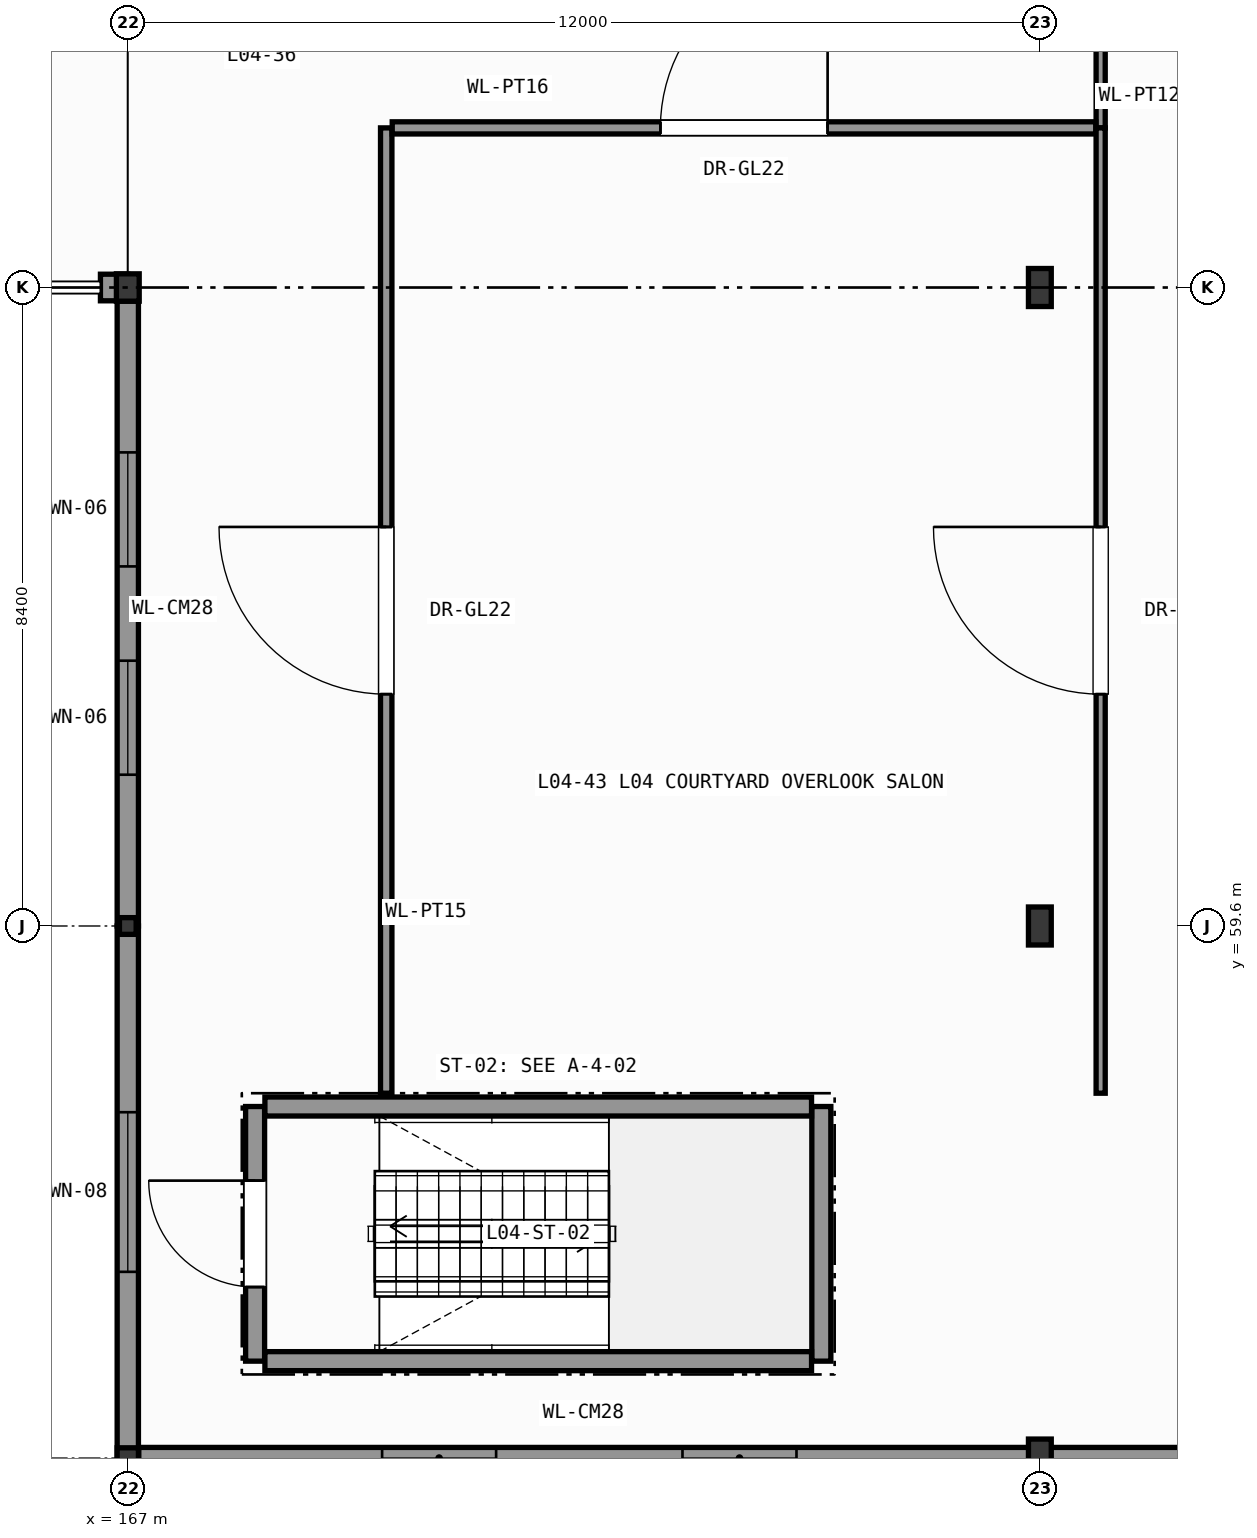
"""IFC4 building model, lengths in metres.
Left out: names, types, materials, properties, quantities, classifications, styles, units other than length and angle.
Written with IfcOpenShell. Run it as: python <this file> out.ifc"""

import sys

from ifc_helpers import new_model, si_unit, direction, frame, frame_2d, origin, origin_2d, place, context, subcontext, project, spatial, rectangle, hollow_rectangle, i_section, extrude, element, fill, save


model = new_model("IFC4")
c1 = context("Model", 3, precision=1e-05, world=origin(), true_north=direction((0.0, 1.0)))
c2 = subcontext(c1, "Body", "Model", "MODEL_VIEW")
j1 = project(units=[si_unit("LENGTHUNIT", "METRE"), si_unit("PLANEANGLEUNIT", "RADIAN")], contexts=[c1])
p1 = place(None, origin())
s1 = spatial("IfcSite", under=j1, at=p1, CompositionType="ELEMENT")
p2 = place(p1, origin())
s2 = spatial("IfcBuilding", under=s1, at=p2, CompositionType="ELEMENT")
p3 = place(p2, frame((0.0, 0.0, 18.0)))
s3 = spatial("IfcBuildingStorey", under=s2, at=p3, CompositionType="ELEMENT", Elevation=18.0)
p4 = place(p3, frame((167.0, 52.6, 0.0), z_axis=(0.0, 0.0, 1.0), x_axis=(1.0, 0.0, 0.0)))
e1 = element("IfcColumn", 1, at=p4, inside=s3, PredefinedType="COLUMN", context=c2, shape_type="SweptSolid", body=[
    extrude(i_section(OverallWidth=0.28, OverallDepth=0.27, WebThickness=0.008, FlangeThickness=0.013, FilletRadius=0.024, at=origin_2d()), origin(), (0.0, 0.0, 1.0), 4.2),
])
p5 = place(p3, frame((167.0, 59.6, 0.0), z_axis=(0.0, 0.0, 1.0), x_axis=(1.0, 0.0, 0.0)))
e2 = element("IfcColumn", 2, at=p5, inside=s3, PredefinedType="COLUMN", context=c2, shape_type="SweptSolid", body=[
    extrude(hollow_rectangle(XDim=0.22, YDim=0.22, WallThickness=0.012, InnerFilletRadius=0.012, OuterFilletRadius=0.024, at=origin_2d()), origin(), (0.0, 0.0, 1.0), 4.2),
])
p6 = place(p3, frame((167.0, 68.0, 0.0), z_axis=(0.0, 0.0, 1.0), x_axis=(1.0, 0.0, 0.0)))
e3 = element("IfcColumn", 3, at=p6, inside=s3, PredefinedType="COLUMN", context=c2, shape_type="SweptSolid", body=[
    extrude(i_section(OverallWidth=0.3, OverallDepth=0.36, WebThickness=0.012, FlangeThickness=0.022, FilletRadius=0.027, at=origin_2d()), origin(), (0.0, 0.0, 1.0), 4.2),
])
for number, where, z_axis, x_axis in (
    (4, (179.0, 52.6, 0.0), (0.0, 0.0, 1.0), (1.0, 0.0, 0.0)),
    (5, (179.0, 59.6, 0.0), (0.0, 0.0, 1.0), (1.0, 0.0, 0.0)),
    (6, (179.0, 68.0, 0.0), (0.0, 0.0, 1.0), (1.0, 0.0, 0.0)),
):
    element("IfcColumn", number, at=place(p3, frame(where, z_axis=z_axis, x_axis=x_axis)), inside=s3, PredefinedType="COLUMN", context=c2, shape_type="SweptSolid", body=[
        extrude(i_section(OverallWidth=0.3, OverallDepth=0.5, WebThickness=0.014, FlangeThickness=0.028, FilletRadius=0.027, at=origin_2d()), origin(), (0.0, 0.0, 1.0), 4.2),
    ])
p7 = place(p3, frame((166.64, 68.0, 0.0), z_axis=(0.0, 0.0, 1.0), x_axis=(1.0, 0.0, 0.0)))
e7 = element("IfcWall", 7, at=p7, inside=s3, PredefinedType="SOLIDWALL", context=c2, shape_type="SweptSolid", body=[
    extrude(rectangle(XDim=0.36, YDim=0.35, at=frame_2d((0.18, 0.0))), origin(), (0.0, 0.0, 1.0), 3.385),
])
p8 = place(p3, frame((167.0, 59.6, 0.0), z_axis=(0.0, 0.0, 1.0), x_axis=(0.0, 1.0, 0.0)))
e8 = element("IfcWall", 8, at=p8, inside=s3, PredefinedType="SOLIDWALL", context=c2, shape_type="SweptSolid", body=[
    extrude(rectangle(XDim=8.221, YDim=0.28, at=frame_2d((4.11, 0.0))), origin(), (0.0, 0.0, 1.0), 3.495),
])
p9 = place(p8, frame((1.99, 0.0, 0.95)))
e9 = element("IfcOpeningElement", 9, at=p9, cuts=e8, PredefinedType="OPENING", context=c2, shape_type="SweptSolid", body=[
    extrude(rectangle(XDim=1.5, YDim=2.15, at=frame_2d((0.75, 1.075))), frame((0.0, 0.15, 0.0), z_axis=(0.0, -1.0, 0.0), x_axis=(1.0, 0.0, 0.0)), (0.0, 0.0, 1.0), 0.3),
])
p10 = place(p8, frame((4.731, 0.0, 0.95)))
e10 = element("IfcOpeningElement", 10, at=p10, cuts=e8, PredefinedType="OPENING", context=c2, shape_type="SweptSolid", body=[
    extrude(rectangle(XDim=1.5, YDim=2.15, at=frame_2d((0.75, 1.075))), frame((0.0, 0.15, 0.0), z_axis=(0.0, -1.0, 0.0), x_axis=(1.0, 0.0, 0.0)), (0.0, 0.0, 1.0), 0.3),
])
p11 = place(p3, frame((167.0, 52.6, 0.0), z_axis=(0.0, 0.0, 1.0), x_axis=(0.0, 1.0, 0.0)))
e11 = element("IfcWall", 11, at=p11, inside=s3, PredefinedType="SOLIDWALL", context=c2, shape_type="SweptSolid", body=[
    extrude(rectangle(XDim=7.0, YDim=0.28, at=frame_2d((3.5, 0.0))), origin(), (0.0, 0.0, 1.0), 3.645),
])
p12 = place(p11, frame((2.45, 0.0, 0.95)))
e12 = element("IfcOpeningElement", 12, at=p12, cuts=e11, PredefinedType="OPENING", context=c2, shape_type="SweptSolid", body=[
    extrude(rectangle(XDim=2.1, YDim=2.29, at=frame_2d((1.05, 1.145))), frame((0.0, 0.15, 0.0), z_axis=(0.0, -1.0, 0.0), x_axis=(1.0, 0.0, 0.0)), (0.0, 0.0, 1.0), 0.3),
])
p13 = place(p3, frame((179.0, 52.6, 0.0), z_axis=(0.0, 0.0, 1.0), x_axis=(-1.0, 0.0, 0.0)))
e13 = element("IfcWall", 13, at=p13, inside=s3, PredefinedType="SOLIDWALL", context=c2, shape_type="SweptSolid", body=[
    extrude(rectangle(XDim=11.856, YDim=0.28, at=frame_2d((5.928, 0.0))), origin(), (0.0, 0.0, 1.0), 3.385),
])
p14 = place(p13, frame((3.202, 0.0, 0.95)))
e14 = element("IfcOpeningElement", 14, at=p14, cuts=e13, PredefinedType="OPENING", context=c2, shape_type="SweptSolid", body=[
    extrude(rectangle(XDim=1.5, YDim=2.04, at=frame_2d((0.75, 1.02))), frame((0.0, 0.15, 0.0), z_axis=(0.0, -1.0, 0.0), x_axis=(1.0, 0.0, 0.0)), (0.0, 0.0, 1.0), 0.3),
])
p15 = place(p13, frame((7.154, 0.0, 0.95)))
e15 = element("IfcOpeningElement", 15, at=p15, cuts=e13, PredefinedType="OPENING", context=c2, shape_type="SweptSolid", body=[
    extrude(rectangle(XDim=1.5, YDim=2.04, at=frame_2d((0.75, 1.02))), frame((0.0, 0.15, 0.0), z_axis=(0.0, -1.0, 0.0), x_axis=(1.0, 0.0, 0.0)), (0.0, 0.0, 1.0), 0.3),
])
p16 = place(p3, frame((192.11, 52.6, 0.0), z_axis=(0.0, 0.0, 1.0), x_axis=(-1.0, 0.0, 0.0)))
e16 = element("IfcWall", 16, at=p16, inside=s3, PredefinedType="SOLIDWALL", context=c2, shape_type="SweptSolid", body=[
    extrude(rectangle(XDim=13.11, YDim=0.28, at=frame_2d((6.555, 0.0))), origin(), (0.0, 0.0, 1.0), 3.385),
])
p17 = place(p16, frame((3.32, 0.0, 0.95)))
e17 = element("IfcOpeningElement", 17, at=p17, cuts=e16, PredefinedType="OPENING", context=c2, shape_type="SweptSolid", body=[
    extrude(rectangle(XDim=2.1, YDim=2.04, at=frame_2d((1.05, 1.02))), frame((0.0, 0.15, 0.0), z_axis=(0.0, -1.0, 0.0), x_axis=(1.0, 0.0, 0.0)), (0.0, 0.0, 1.0), 0.3),
])
p18 = place(p16, frame((7.69, 0.0, 0.95)))
e18 = element("IfcOpeningElement", 18, at=p18, cuts=e16, PredefinedType="OPENING", context=c2, shape_type="SweptSolid", body=[
    extrude(rectangle(XDim=2.1, YDim=2.04, at=frame_2d((1.05, 1.02))), frame((0.0, 0.15, 0.0), z_axis=(0.0, -1.0, 0.0), x_axis=(1.0, 0.0, 0.0)), (0.0, 0.0, 1.0), 0.3),
])
p19 = place(p3, frame((168.675, 53.875, 0.0), z_axis=(0.0, 0.0, 1.0), x_axis=(0.0, 1.0, 0.0)))
e19 = element("IfcWall", 19, at=p19, inside=s3, PredefinedType="SHEAR", context=c2, shape_type="SweptSolid", body=[
    extrude(rectangle(XDim=3.35, YDim=0.25, at=frame_2d((1.675, 0.0))), origin(), (0.0, 0.0, 1.0), 3.98),
])
p20 = place(p19, frame((0.975, 0.0, 0.0)))
e20 = element("IfcOpeningElement", 20, at=p20, cuts=e19, PredefinedType="OPENING", context=c2, shape_type="SweptSolid", body=[
    extrude(rectangle(XDim=1.4, YDim=2.2, at=frame_2d((0.7, 1.1))), frame((0.0, 0.135, 0.0), z_axis=(0.0, -1.0, 0.0), x_axis=(1.0, 0.0, 0.0)), (0.0, 0.0, 1.0), 0.27),
])
p21 = place(p3, frame((176.125, 53.875, 0.0), z_axis=(0.0, 0.0, 1.0), x_axis=(0.0, 1.0, 0.0)))
e21 = element("IfcWall", 21, at=p21, inside=s3, PredefinedType="SHEAR", context=c2, shape_type="SweptSolid", body=[
    extrude(rectangle(XDim=3.35, YDim=0.25, at=frame_2d((1.675, 0.0))), origin(), (0.0, 0.0, 1.0), 3.98),
])
for number, where, z_axis, x_axis in (
    (22, (168.804, 53.875, 0.0), (0.0, 0.0, 1.0), (1.0, 0.0, 0.0)),
    (23, (168.804, 57.225, 0.0), (0.0, 0.0, 1.0), (1.0, 0.0, 0.0)),
):
    element("IfcWall", number, at=place(p3, frame(where, z_axis=z_axis, x_axis=x_axis)), inside=s3, PredefinedType="SHEAR", context=c2, shape_type="SweptSolid", body=[
        extrude(rectangle(XDim=7.192, YDim=0.25, at=frame_2d((3.596, 0.0))), origin(), (0.0, 0.0, 1.0), 3.98),
    ])
p22 = place(p3, frame((170.4, 57.4, 0.0), z_axis=(0.0, 0.0, 1.0), x_axis=(0.0, 1.0, 0.0)))
e24 = element("IfcWall", 24, at=p22, inside=s3, PredefinedType="PARTITIONING", context=c2, shape_type="SweptSolid", body=[
    extrude(rectangle(XDim=12.7, YDim=0.15, at=frame_2d((6.35, 0.0))), origin(), (0.0, 0.0, 1.0), 3.98),
])
p23 = place(p22, frame((5.25, 0.0, 0.0)))
e25 = element("IfcOpeningElement", 25, at=p23, cuts=e24, PredefinedType="OPENING", context=c2, shape_type="SweptSolid", body=[
    extrude(rectangle(XDim=2.2, YDim=2.6, at=frame_2d((1.1, 1.3))), frame((0.0, 0.085, 0.0), z_axis=(0.0, -1.0, 0.0), x_axis=(1.0, 0.0, 0.0)), (0.0, 0.0, 1.0), 0.17),
])
p24 = place(p3, frame((179.8, 70.1, 0.0), z_axis=(0.0, 0.0, 1.0), x_axis=(0.0, 1.0, 0.0)))
e26 = element("IfcWall", 26, at=p24, inside=s3, PredefinedType="PARTITIONING", context=c2, shape_type="SweptSolid", body=[
    extrude(rectangle(XDim=3.4, YDim=0.12, at=frame_2d((1.7, 0.0))), origin(), (0.0, 0.0, 1.0), 3.98),
])
p25 = place(p24, frame((1.2, 0.0, 0.0)))
e27 = element("IfcOpeningElement", 27, at=p25, cuts=e26, PredefinedType="OPENING", context=c2, shape_type="SweptSolid", body=[
    extrude(rectangle(XDim=1.0, YDim=2.15, at=frame_2d((0.5, 1.075))), frame((0.0, 0.07, 0.0), z_axis=(0.0, -1.0, 0.0), x_axis=(1.0, 0.0, 0.0)), (0.0, 0.0, 1.0), 0.14),
])
p26 = place(p3, frame((170.479, 70.1, 0.0), z_axis=(0.0, 0.0, 1.0), x_axis=(1.0, 0.0, 0.0)))
e28 = element("IfcWall", 28, at=p26, inside=s3, PredefinedType="PARTITIONING", context=c2, shape_type="SweptSolid", body=[
    extrude(rectangle(XDim=9.257, YDim=0.16, at=frame_2d((4.628, 0.0))), origin(), (0.0, 0.0, 1.0), 3.98),
])
p27 = place(p26, frame((3.529, 0.0, 0.0)))
e29 = element("IfcOpeningElement", 29, at=p27, cuts=e28, PredefinedType="OPENING", context=c2, shape_type="SweptSolid", body=[
    extrude(rectangle(XDim=2.2, YDim=2.6, at=frame_2d((1.1, 1.3))), frame((0.0, 0.09, 0.0), z_axis=(0.0, -1.0, 0.0), x_axis=(1.0, 0.0, 0.0)), (0.0, 0.0, 1.0), 0.18),
])
p28 = place(p3, frame((179.8, 57.4, 0.0), z_axis=(0.0, 0.0, 1.0), x_axis=(0.0, 1.0, 0.0)))
e30 = element("IfcWall", 30, at=p28, inside=s3, PredefinedType="PARTITIONING", context=c2, shape_type="SweptSolid", body=[
    extrude(rectangle(XDim=12.7, YDim=0.12, at=frame_2d((6.35, 0.0))), origin(), (0.0, 0.0, 1.0), 3.98),
])
p29 = place(p28, frame((5.25, 0.0, 0.0)))
e31 = element("IfcOpeningElement", 31, at=p29, cuts=e30, PredefinedType="OPENING", context=c2, shape_type="SweptSolid", body=[
    extrude(rectangle(XDim=2.2, YDim=2.6, at=frame_2d((1.1, 1.3))), frame((0.0, 0.07, 0.0), z_axis=(0.0, -1.0, 0.0), x_axis=(1.0, 0.0, 0.0)), (0.0, 0.0, 1.0), 0.14),
])
p30 = place(p9, origin())
e32 = element("IfcWindow", 32, at=p30, inside=s3, PartitioningType="SINGLE_PANEL", PredefinedType="WINDOW", context=c2, shape_type="SweptSolid", body=[
    extrude(rectangle(XDim=1.5, YDim=2.15, at=frame_2d((0.75, 1.075))), frame((0.0, 0.03, 0.0), z_axis=(0.0, -1.0, 0.0), x_axis=(1.0, 0.0, 0.0)), (0.0, 0.0, 1.0), 0.06),
])
fill(e9, e32)
p31 = place(p10, origin())
e33 = element("IfcWindow", 33, at=p31, inside=s3, PartitioningType="SINGLE_PANEL", PredefinedType="WINDOW", context=c2, shape_type="SweptSolid", body=[
    extrude(rectangle(XDim=1.5, YDim=2.15, at=frame_2d((0.75, 1.075))), frame((0.0, 0.03, 0.0), z_axis=(0.0, -1.0, 0.0), x_axis=(1.0, 0.0, 0.0)), (0.0, 0.0, 1.0), 0.06),
])
fill(e10, e33)
p32 = place(p12, origin())
e34 = element("IfcWindow", 34, at=p32, inside=s3, PartitioningType="SINGLE_PANEL", PredefinedType="WINDOW", context=c2, shape_type="SweptSolid", body=[
    extrude(rectangle(XDim=2.1, YDim=2.29, at=frame_2d((1.05, 1.145))), frame((0.0, 0.03, 0.0), z_axis=(0.0, -1.0, 0.0), x_axis=(1.0, 0.0, 0.0)), (0.0, 0.0, 1.0), 0.06),
])
fill(e12, e34)
p33 = place(p14, origin())
e35 = element("IfcWindow", 35, at=p33, inside=s3, PartitioningType="SINGLE_PANEL", PredefinedType="WINDOW", context=c2, shape_type="SweptSolid", body=[
    extrude(rectangle(XDim=1.5, YDim=2.04, at=frame_2d((0.75, 1.02))), frame((0.0, 0.03, 0.0), z_axis=(0.0, -1.0, 0.0), x_axis=(1.0, 0.0, 0.0)), (0.0, 0.0, 1.0), 0.06),
])
fill(e14, e35)
p34 = place(p15, origin())
e36 = element("IfcWindow", 36, at=p34, inside=s3, PartitioningType="SINGLE_PANEL", PredefinedType="WINDOW", context=c2, shape_type="SweptSolid", body=[
    extrude(rectangle(XDim=1.5, YDim=2.04, at=frame_2d((0.75, 1.02))), frame((0.0, 0.03, 0.0), z_axis=(0.0, -1.0, 0.0), x_axis=(1.0, 0.0, 0.0)), (0.0, 0.0, 1.0), 0.06),
])
fill(e15, e36)
p35 = place(p20, origin())
e37 = element("IfcDoor", 37, at=p35, inside=s3, OperationType="SINGLE_SWING_RIGHT", PredefinedType="DOOR", context=c2, shape_type="SweptSolid", body=[
    extrude(rectangle(XDim=1.4, YDim=2.2, at=frame_2d((0.7, 1.1))), frame((0.0, 0.025, 0.0), z_axis=(0.0, -1.0, 0.0), x_axis=(1.0, 0.0, 0.0)), (0.0, 0.0, 1.0), 0.05),
])
fill(e20, e37)
p36 = place(p23, origin())
e38 = element("IfcDoor", 38, at=p36, inside=s3, OperationType="SINGLE_SWING_RIGHT", PredefinedType="DOOR", context=c2, shape_type="SweptSolid", body=[
    extrude(rectangle(XDim=2.2, YDim=2.6, at=frame_2d((1.1, 1.3))), frame((0.0, 0.025, 0.0), z_axis=(0.0, -1.0, 0.0), x_axis=(1.0, 0.0, 0.0)), (0.0, 0.0, 1.0), 0.05),
])
fill(e25, e38)
p37 = place(p27, origin())
e39 = element("IfcDoor", 39, at=p37, inside=s3, OperationType="SINGLE_SWING_RIGHT", PredefinedType="DOOR", context=c2, shape_type="SweptSolid", body=[
    extrude(rectangle(XDim=2.2, YDim=2.6, at=frame_2d((1.1, 1.3))), frame((0.0, 0.025, 0.0), z_axis=(0.0, -1.0, 0.0), x_axis=(1.0, 0.0, 0.0)), (0.0, 0.0, 1.0), 0.05),
])
fill(e29, e39)
p38 = place(p29, origin())
e40 = element("IfcDoor", 40, at=p38, inside=s3, OperationType="SINGLE_SWING_RIGHT", PredefinedType="DOOR", context=c2, shape_type="SweptSolid", body=[
    extrude(rectangle(XDim=2.2, YDim=2.6, at=frame_2d((1.1, 1.3))), frame((0.0, 0.025, 0.0), z_axis=(0.0, -1.0, 0.0), x_axis=(1.0, 0.0, 0.0)), (0.0, 0.0, 1.0), 0.05),
])
fill(e31, e40)
save(model, sys.argv[1])
